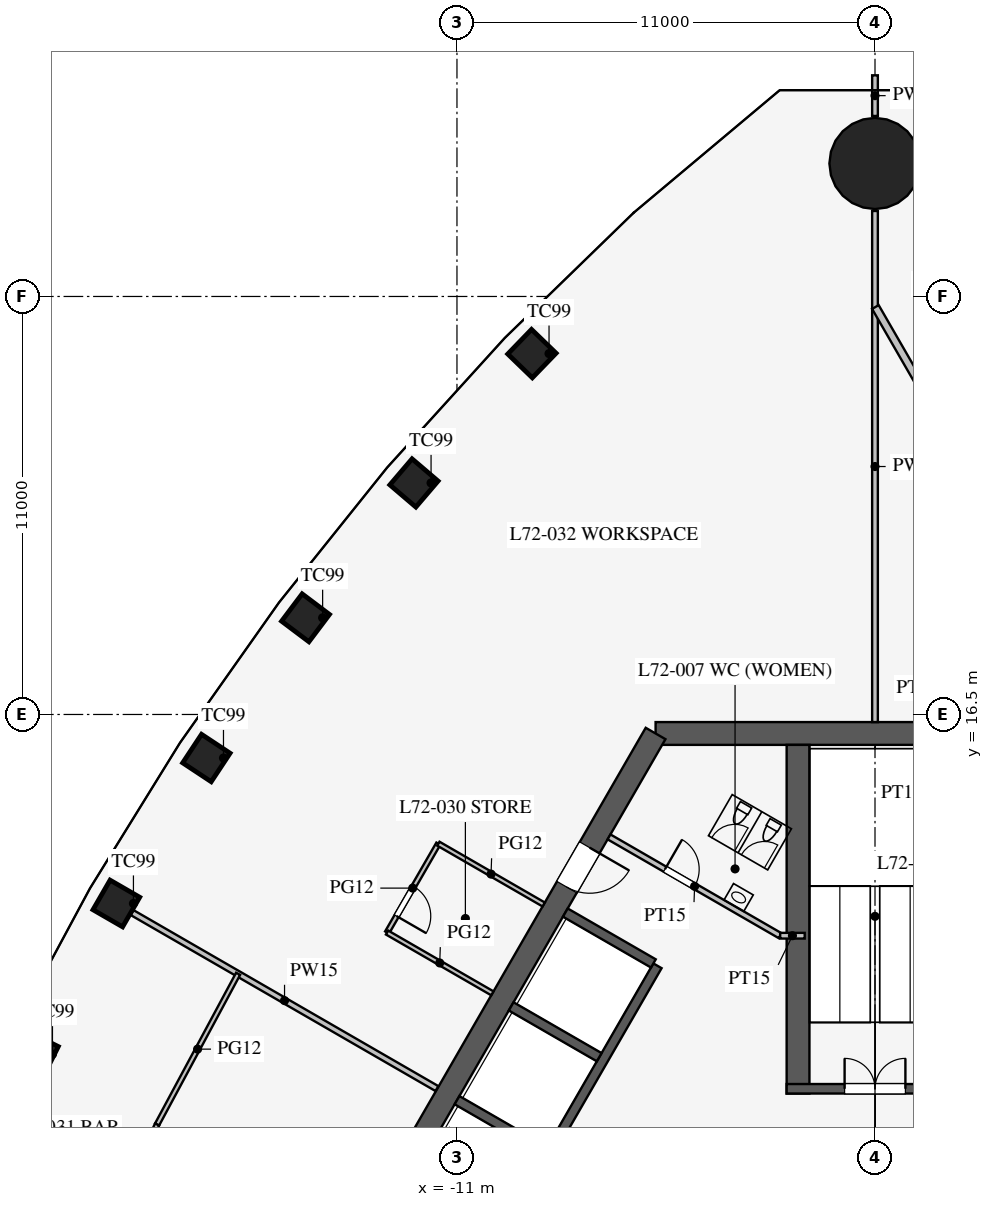
"""IFC4 building model, lengths in metres.
Left out: names, types, materials, properties, quantities, classifications, styles, units other than length and angle.
Written with IfcOpenShell. Run it as: python <this file> out.ifc"""

import sys

from ifc_helpers import new_model, si_unit, direction, frame, frame_2d, origin, origin_2d, place, context, subcontext, project, spatial, rectangle, circle, extrude, element, fill, save


model = new_model("IFC4")
c1 = context("Model", 3, precision=1e-05, world=origin(), true_north=direction((0.0, 1.0)))
c2 = subcontext(c1, "Body", "Model", "MODEL_VIEW")
j1 = project(units=[si_unit("LENGTHUNIT", "METRE"), si_unit("PLANEANGLEUNIT", "RADIAN")], contexts=[c1])
p1 = place(None, origin())
s1 = spatial("IfcSite", under=j1, at=p1, CompositionType="ELEMENT")
p2 = place(p1, origin())
s2 = spatial("IfcBuilding", under=s1, at=p2, CompositionType="ELEMENT")
p3 = place(p2, frame((0.0, 0.0, 314.1)))
s3 = spatial("IfcBuildingStorey", under=s2, at=p3, CompositionType="ELEMENT", Elevation=314.1)
for number, where, z_axis, x_axis in (
    (1, (-9.027, 25.997, 0.0), (0.0, 0.0, 1.0), (-0.695, -0.719, 0.0)),
    (2, (-12.132, 22.593, 0.0), (0.0, 0.0, 1.0), (-0.649, -0.761, 0.0)),
    (3, (-14.985, 19.044, 0.0), (0.0, 0.0, 1.0), (-0.601, -0.799, 0.0)),
    (4, (-17.594, 15.354, 0.0), (0.0, 0.0, 1.0), (-0.552, -0.834, 0.0)),
    (5, (-19.963, 11.526, 0.0), (0.0, 0.0, 1.0), (-0.5, -0.866, 0.0)),
    (6, (-22.094, 7.56, 0.0), (0.0, 0.0, 1.0), (-0.447, -0.895, 0.0)),
):
    element("IfcColumn", number, at=place(p3, frame(where, z_axis=z_axis, x_axis=x_axis)), inside=s3, PredefinedType="COLUMN", context=c2, shape_type="SweptSolid", body=[
        extrude(rectangle(XDim=0.9, YDim=0.9, at=origin_2d()), origin(), (0.0, 0.0, 1.0), 4.2),
    ])
p4 = place(p3, frame((0.0, 31.0, 0.0), z_axis=(0.0, 0.0, 1.0), x_axis=(1.0, 0.0, 0.0)))
e7 = element("IfcColumn", 7, at=p4, inside=s3, PredefinedType="COLUMN", context=c2, shape_type="SweptSolid", body=[
    extrude(circle(Radius=1.2, at=origin_2d()), origin(), (0.0, 0.0, 1.0), 4.2),
])
p5 = place(p3, frame((5.773, 16.0, 0.0), z_axis=(0.0, 0.0, 1.0), x_axis=(-1.0, 0.0, 0.0)))
e8 = element("IfcWall", 8, at=p5, inside=s3, PredefinedType="SHEAR", context=c2, shape_type="SweptSolid", body=[
    extrude(rectangle(XDim=11.547, YDim=0.6, at=frame_2d((5.773, 0.0))), origin(), (0.0, 0.0, 1.0), 4.2),
])
p6 = place(p3, frame((-5.773, 16.0, 0.0), z_axis=(0.0, 0.0, 1.0), x_axis=(-0.500002442456, -0.866023993627, 0.0)))
e9 = element("IfcWall", 9, at=p6, inside=s3, PredefinedType="SHEAR", context=c2, shape_type="SweptSolid", body=[
    extrude(rectangle(XDim=21.939, YDim=0.6, at=frame_2d((10.97, 0.0))), origin(), (0.0, 0.0, 1.0), 4.2),
])
p7 = place(p6, frame((17.27, 0.0, 0.0)))
e10 = element("IfcOpeningElement", 10, at=p7, cuts=e9, PredefinedType="OPENING", context=c2, shape_type="SweptSolid", body=[
    extrude(rectangle(XDim=1.2, YDim=2.1, at=frame_2d((0.6, 1.05))), frame((0.0, 0.31, 0.0), z_axis=(0.0, -1.0, 0.0), x_axis=(1.0, 0.0, 0.0)), (0.0, 0.0, 1.0), 0.62),
])
p8 = place(p6, frame((3.47, 0.0, 0.0)))
e11 = element("IfcOpeningElement", 11, at=p8, cuts=e9, PredefinedType="OPENING", context=c2, shape_type="SweptSolid", body=[
    extrude(rectangle(XDim=1.2, YDim=2.1, at=frame_2d((0.6, 1.05))), frame((0.0, 0.31, 0.0), z_axis=(0.0, -1.0, 0.0), x_axis=(1.0, 0.0, 0.0)), (0.0, 0.0, 1.0), 0.62),
])
p9 = place(p3, frame((-5.724, 9.886, 0.0), z_axis=(0.0, 0.0, 1.0), x_axis=(-0.500001763848, -0.866024385424, 0.0)))
e12 = element("IfcWall", 12, at=p9, inside=s3, PredefinedType="SHEAR", context=c2, shape_type="SweptSolid", body=[
    extrude(rectangle(XDim=11.4, YDim=0.25, at=frame_2d((5.7, 0.0))), origin(), (0.0, 0.0, 1.0), 4.2),
])
p10 = place(p9, frame((6.525, 0.0, 0.0)))
e13 = element("IfcOpeningElement", 13, at=p10, cuts=e12, PredefinedType="OPENING", context=c2, shape_type="SweptSolid", body=[
    extrude(rectangle(XDim=1.2, YDim=2.2, at=frame_2d((0.6, 1.1))), frame((0.0, 0.135, 0.0), z_axis=(0.0, -1.0, 0.0), x_axis=(1.0, 0.0, 0.0)), (0.0, 0.0, 1.0), 0.27),
])
p11 = place(p9, frame((9.375, 0.0, 0.0)))
e14 = element("IfcOpeningElement", 14, at=p11, cuts=e12, PredefinedType="OPENING", context=c2, shape_type="SweptSolid", body=[
    extrude(rectangle(XDim=1.2, YDim=2.2, at=frame_2d((0.6, 1.1))), frame((0.0, 0.135, 0.0), z_axis=(0.0, -1.0, 0.0), x_axis=(1.0, 0.0, 0.0)), (0.0, 0.0, 1.0), 0.27),
])
for number, where, z_axis, x_axis in (
    (15, (-5.832, 9.949, 0.0), (0.0, 0.0, 1.0), (-0.866, 0.5, 0.0)),
    (16, (-7.257, 7.481, 0.0), (0.0, 0.0, 1.0), (-0.866, 0.5, 0.0)),
    (17, (-8.682, 5.012, 0.0), (0.0, 0.0, 1.0), (-0.866, 0.5, 0.0)),
):
    element("IfcWall", number, at=place(p3, frame(where, z_axis=z_axis, x_axis=x_axis)), inside=s3, PredefinedType="SHEAR", context=c2, shape_type="SweptSolid", body=[
        extrude(rectangle(XDim=2.675, YDim=0.25, at=frame_2d((1.337, 0.0))), origin(), (0.0, 0.0, 1.0), 4.2),
    ])
p12 = place(p3, frame((-2.025, 6.525, 0.0), z_axis=(0.0, 0.0, 1.0), x_axis=(0.0, 1.0, 0.0)))
e18 = element("IfcWall", 18, at=p12, inside=s3, PredefinedType="SHEAR", context=c2, shape_type="SweptSolid", body=[
    extrude(rectangle(XDim=9.175, YDim=0.6, at=frame_2d((4.587, 0.0))), origin(), (0.0, 0.0, 1.0), 4.2),
])
p13 = place(p3, frame((2.325, 6.65, 0.0), z_axis=(0.0, 0.0, 1.0), x_axis=(-1.0, 0.0, 0.0)))
e19 = element("IfcWall", 19, at=p13, inside=s3, PredefinedType="SHEAR", context=c2, shape_type="SweptSolid", body=[
    extrude(rectangle(XDim=4.65, YDim=0.25, at=frame_2d((2.325, 0.0))), origin(), (0.0, 0.0, 1.0), 4.2),
])
p14 = place(p13, frame((1.525, 0.0, 0.0)))
e20 = element("IfcOpeningElement", 20, at=p14, cuts=e19, PredefinedType="OPENING", context=c2, shape_type="SweptSolid", body=[
    extrude(rectangle(XDim=1.6, YDim=2.1, at=frame_2d((0.8, 1.05))), frame((0.0, 0.135, 0.0), z_axis=(0.0, -1.0, 0.0), x_axis=(1.0, 0.0, 0.0)), (0.0, 0.0, 1.0), 0.27),
])
p15 = place(p3, frame((-2.495, 10.678, 0.0), z_axis=(0.0, 0.0, 1.0), x_axis=(-0.866021400173, 0.500006934395, 0.0)))
e21 = element("IfcWall", 21, at=p15, inside=s3, PredefinedType="PARTITIONING", context=c2, shape_type="SweptSolid", body=[
    extrude(rectangle(XDim=5.2, YDim=0.15, at=frame_2d((2.6, 0.0))), origin(), (0.0, 0.0, 1.0), 4.0),
])
p16 = place(p15, frame((2.6, 0.0, 0.0)))
e22 = element("IfcOpeningElement", 22, at=p16, cuts=e21, PredefinedType="OPENING", context=c2, shape_type="SweptSolid", body=[
    extrude(rectangle(XDim=0.9, YDim=2.1, at=frame_2d((0.45, 1.05))), frame((0.0, 0.085, 0.0), z_axis=(0.0, -1.0, 0.0), x_axis=(1.0, 0.0, 0.0)), (0.0, 0.0, 1.0), 0.17),
])
p17 = place(p3, frame((-2.495, 10.678, 0.0), z_axis=(0.0, 0.0, 1.0), x_axis=(1.0, 0.0, 0.0)))
e23 = element("IfcWall", 23, at=p17, inside=s3, PredefinedType="PARTITIONING", context=c2, shape_type="SweptSolid", body=[
    extrude(rectangle(XDim=0.645, YDim=0.15, at=frame_2d((0.323, 0.0))), origin(), (0.0, 0.0, 1.0), 4.0),
])
p18 = place(p3, frame((0.0, 16.3, 0.0), z_axis=(0.0, 0.0, 1.0), x_axis=(0.0, 1.0, 0.0)))
e24 = element("IfcWall", 24, at=p18, inside=s3, PredefinedType="PARTITIONING", context=c2, shape_type="SweptSolid", body=[
    extrude(rectangle(XDim=13.45, YDim=0.15, at=frame_2d((6.725, 0.0))), origin(), (0.0, 0.0, 1.0), 2.5),
])
p19 = place(p3, frame((0.0, 32.25, 0.0), z_axis=(0.0, 0.0, 1.0), x_axis=(0.0, 1.0, 0.0)))
e25 = element("IfcWall", 25, at=p19, inside=s3, PredefinedType="PARTITIONING", context=c2, shape_type="SweptSolid", body=[
    extrude(rectangle(XDim=1.07, YDim=0.15, at=frame_2d((0.535, 0.0))), origin(), (0.0, 0.0, 1.0), 2.5),
])
p20 = place(p3, frame((5.045, 18.501, 0.0), z_axis=(0.0, 0.0, 1.0), x_axis=(-0.499990381663, 0.866030956863, 0.0)))
e26 = element("IfcWall", 26, at=p20, inside=s3, PredefinedType="PARTITIONING", context=c2, shape_type="SweptSolid", body=[
    extrude(rectangle(XDim=10.07, YDim=0.2, at=frame_2d((5.035, 0.0))), origin(), (0.0, 0.0, 1.0), 2.9),
])
p21 = place(p20, frame((1.25, 0.0, 0.15)))
e27 = element("IfcOpeningElement", 27, at=p21, cuts=e26, PredefinedType="OPENING", context=c2, shape_type="SweptSolid", body=[
    extrude(rectangle(XDim=1.8, YDim=2.1, at=frame_2d((0.9, 1.05))), frame((0.0, 0.11, 0.0), z_axis=(0.0, -1.0, 0.0), x_axis=(1.0, 0.0, 0.0)), (0.0, 0.0, 1.0), 0.22),
])
p22 = place(p3, frame((-11.527, 6.655, 0.0), z_axis=(0.0, 0.0, 1.0), x_axis=(-0.866021846952, 0.500006160563, 0.0)))
e28 = element("IfcWall", 28, at=p22, inside=s3, PredefinedType="PARTITIONING", context=c2, shape_type="SweptSolid", body=[
    extrude(rectangle(XDim=9.262, YDim=0.15, at=frame_2d((4.631, 0.0))), origin(), (0.0, 0.0, 1.0), 3.3),
])
p23 = place(p3, frame((-11.49, 13.1, 0.0), z_axis=(0.0, 0.0, 1.0), x_axis=(-0.4999416173, -0.866059108428, 0.0)))
e29 = element("IfcWall", 29, at=p23, inside=s3, PredefinedType="PARTITIONING", context=c2, shape_type="SweptSolid", body=[
    extrude(rectangle(XDim=2.7, YDim=0.12, at=frame_2d((1.35, 0.0))), origin(), (0.0, 0.0, 1.0), 2.9),
])
p24 = place(p23, frame((1.3, 0.0, 0.15)))
e30 = element("IfcOpeningElement", 30, at=p24, cuts=e29, PredefinedType="OPENING", context=c2, shape_type="SweptSolid", body=[
    extrude(rectangle(XDim=0.9, YDim=2.1, at=frame_2d((0.45, 1.05))), frame((0.0, 0.07, 0.0), z_axis=(0.0, -1.0, 0.0), x_axis=(1.0, 0.0, 0.0)), (0.0, 0.0, 1.0), 0.14),
])
p25 = place(p3, frame((-10.068, 9.161, 0.0), z_axis=(0.0, 0.0, 1.0), x_axis=(-0.866008981251, 0.500028443584, 0.0)))
e31 = element("IfcWall", 31, at=p25, inside=s3, PredefinedType="PARTITIONING", context=c2, shape_type="SweptSolid", body=[
    extrude(rectangle(XDim=3.2, YDim=0.12, at=frame_2d((1.6, 0.0))), origin(), (0.0, 0.0, 1.0), 2.9),
])
p26 = place(p3, frame((-8.718, 11.5, 0.0), z_axis=(0.0, 0.0, 1.0), x_axis=(-0.866028054938, 0.499995408039, 0.0)))
e32 = element("IfcWall", 32, at=p26, inside=s3, PredefinedType="PARTITIONING", context=c2, shape_type="SweptSolid", body=[
    extrude(rectangle(XDim=3.2, YDim=0.12, at=frame_2d((1.6, 0.0))), origin(), (0.0, 0.0, 1.0), 2.9),
])
p27 = place(p3, frame((-16.759, 9.676, 0.0), z_axis=(0.0, 0.0, 1.0), x_axis=(-0.473524102582, -0.880780860529, 0.0)))
e33 = element("IfcWall", 33, at=p27, inside=s3, PredefinedType="PARTITIONING", context=c2, shape_type="SweptSolid", body=[
    extrude(rectangle(XDim=4.502, YDim=0.12, at=frame_2d((2.251, 0.0))), origin(), (0.0, 0.0, 1.0), 2.9),
])
p28 = place(p3, frame((-18.891, 5.71, 0.0), z_axis=(0.0, 0.0, 1.0), x_axis=(-0.419335693458, -0.907831248742, 0.0)))
e34 = element("IfcWall", 34, at=p28, inside=s3, PredefinedType="PARTITIONING", context=c2, shape_type="SweptSolid", body=[
    extrude(rectangle(XDim=4.519, YDim=0.12, at=frame_2d((2.259, 0.0))), origin(), (0.0, 0.0, 1.0), 2.9),
])
p29 = place(p28, frame((1.35, 0.0, 0.15)))
e35 = element("IfcOpeningElement", 35, at=p29, cuts=e34, PredefinedType="OPENING", context=c2, shape_type="SweptSolid", body=[
    extrude(rectangle(XDim=1.8, YDim=2.1, at=frame_2d((0.9, 1.05))), frame((0.0, 0.07, 0.0), z_axis=(0.0, -1.0, 0.0), x_axis=(1.0, 0.0, 0.0)), (0.0, 0.0, 1.0), 0.14),
])
p30 = place(p16, frame((0.9, 0.0, 0.0), z_axis=(0.0, 0.0, 1.0), x_axis=(-1.0, 0.0, 0.0)))
e36 = element("IfcDoor", 36, at=p30, inside=s3, OperationType="SINGLE_SWING_LEFT", PredefinedType="DOOR", context=c2, shape_type="SweptSolid", body=[
    extrude(rectangle(XDim=0.9, YDim=2.1, at=frame_2d((0.45, 1.05))), frame((0.0, 0.025, 0.0), z_axis=(0.0, -1.0, 0.0), x_axis=(1.0, 0.0, 0.0)), (0.0, 0.0, 1.0), 0.05),
])
fill(e22, e36)
p31 = place(p14, frame((1.6, 0.0, 0.0), z_axis=(0.0, 0.0, 1.0), x_axis=(-1.0, 0.0, 0.0)))
e37 = element("IfcDoor", 37, at=p31, inside=s3, OperationType="DOUBLE_DOOR_SINGLE_SWING", PredefinedType="DOOR", context=c2, shape_type="SweptSolid", body=[
    extrude(rectangle(XDim=1.6, YDim=2.1, at=frame_2d((0.8, 1.05))), frame((0.0, 0.025, 0.0), z_axis=(0.0, -1.0, 0.0), x_axis=(1.0, 0.0, 0.0)), (0.0, 0.0, 1.0), 0.05),
])
fill(e20, e37)
p32 = place(p8, origin())
e38 = element("IfcDoor", 38, at=p32, inside=s3, OperationType="SINGLE_SWING_LEFT", PredefinedType="DOOR", context=c2, shape_type="SweptSolid", body=[
    extrude(rectangle(XDim=1.2, YDim=2.1, at=frame_2d((0.6, 1.05))), frame((0.0, 0.025, 0.0), z_axis=(0.0, -1.0, 0.0), x_axis=(1.0, 0.0, 0.0)), (0.0, 0.0, 1.0), 0.05),
])
fill(e11, e38)
p33 = place(p24, origin())
e39 = element("IfcDoor", 39, at=p33, inside=s3, OperationType="SINGLE_SWING_RIGHT", PredefinedType="DOOR", context=c2, shape_type="SweptSolid", body=[
    extrude(rectangle(XDim=0.9, YDim=2.1, at=frame_2d((0.45, 1.05))), frame((0.0, 0.025, 0.0), z_axis=(0.0, -1.0, 0.0), x_axis=(1.0, 0.0, 0.0)), (0.0, 0.0, 1.0), 0.05),
])
fill(e30, e39)
save(model, sys.argv[1])
